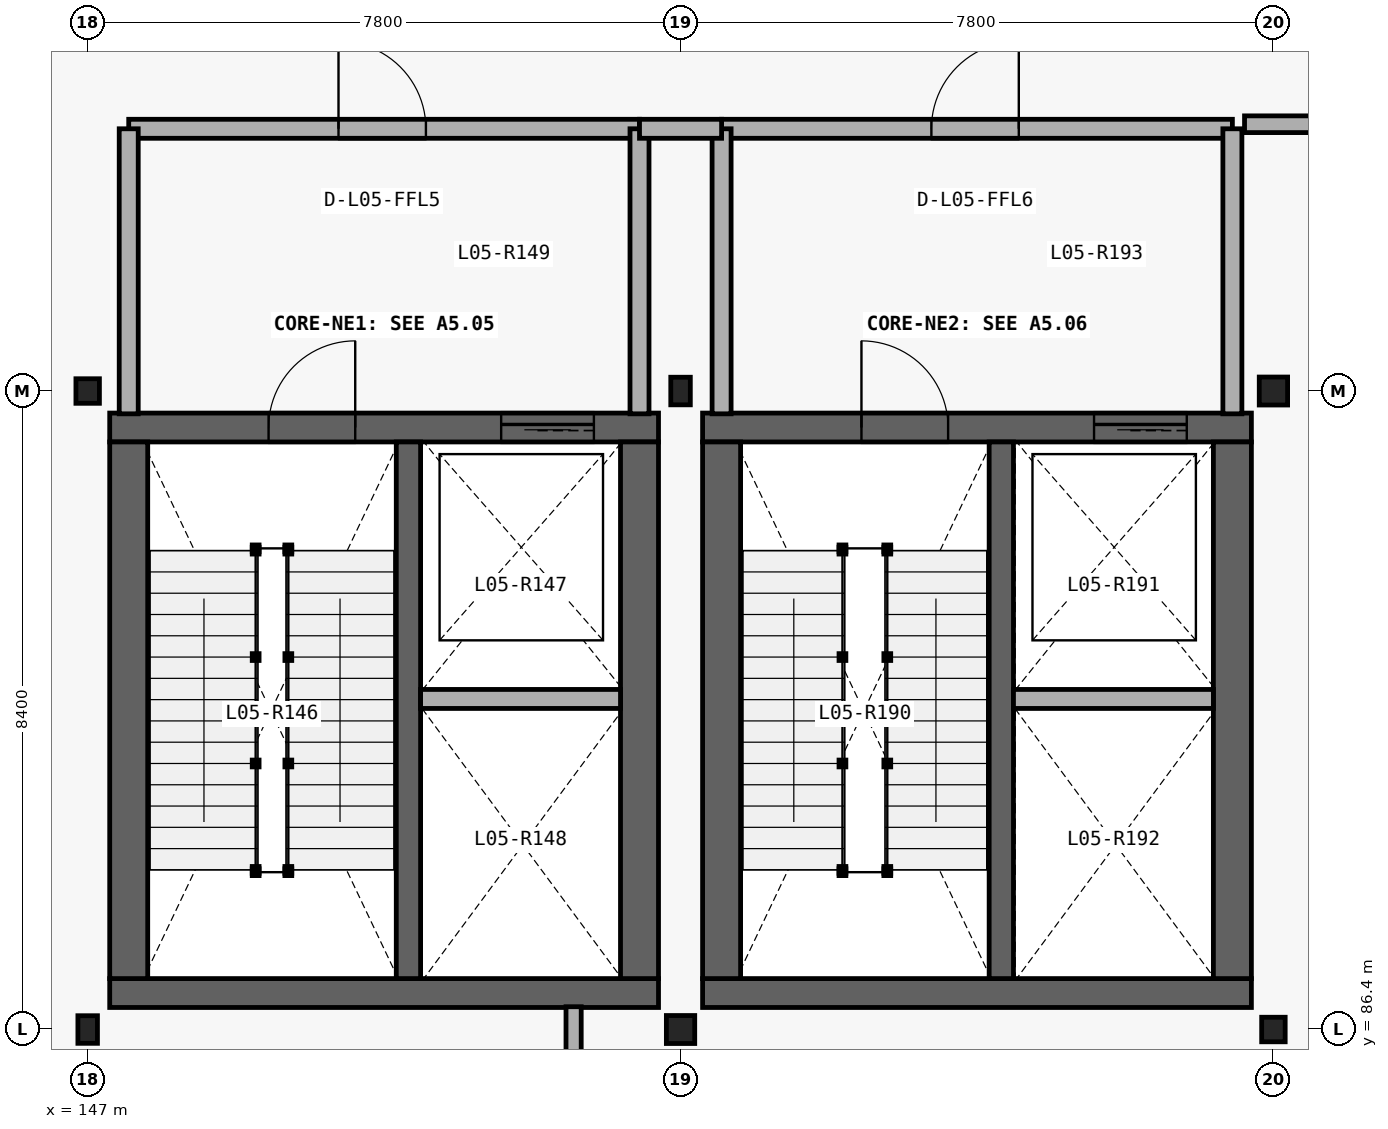
"""IFC4 building model, lengths in metres.
Left out: names, types, materials, properties, quantities, classifications, styles, units other than length and angle.
Written with IfcOpenShell. Run it as: python <this file> out.ifc"""

import sys

from ifc_helpers import new_model, si_unit, direction, frame, frame_2d, origin_with_axes, origin_2d_with_axis, place, context, subcontext, project, spatial, rectangle, i_section, extrude, element, fill, save


model = new_model("IFC4")
c1 = context("Model", 3, precision=1e-05, world=origin_with_axes(), true_north=direction((0.0, 1.0)))
c2 = subcontext(c1, "Body", "Model", "MODEL_VIEW")
j1 = project(units=[si_unit("LENGTHUNIT", "METRE"), si_unit("PLANEANGLEUNIT", "RADIAN")], contexts=[c1])
p1 = place(None, origin_with_axes())
s1 = spatial("IfcSite", under=j1, at=p1, CompositionType="ELEMENT")
p2 = place(p1, origin_with_axes())
s2 = spatial("IfcBuilding", under=s1, at=p2, CompositionType="ELEMENT")
p3 = place(p2, frame((0.0, 0.0, 24.9), z_axis=(0.0, 0.0, 1.0), x_axis=(1.0, 0.0, 0.0)))
s3 = spatial("IfcBuildingStorey", under=s2, at=p3, CompositionType="ELEMENT", Elevation=24.9)
p4 = place(None, frame((147.29, 86.88, 24.9), z_axis=(0.0, 0.0, 1.0), x_axis=(1.0, 0.0, 0.0)))
e1 = element("IfcWall", 1, at=p4, inside=s3, PredefinedType="SHEAR", context=c2, shape_type="SweptSolid", body=[
    extrude(rectangle(XDim=7.22, YDim=0.38, at=frame_2d((3.61, 0.0), x_axis=(1.0, 0.0))), origin_with_axes(), (0.0, 0.0, 1.0), 4.8),
])
p5 = place(None, frame((154.51, 94.32, 24.9), z_axis=(0.0, 0.0, 1.0), x_axis=(-1.0, 0.0, 0.0)))
e2 = element("IfcWall", 2, at=p5, inside=s3, PredefinedType="SHEAR", context=c2, shape_type="SweptSolid", body=[
    extrude(rectangle(XDim=7.22, YDim=0.38, at=frame_2d((3.61, 0.0), x_axis=(1.0, 0.0))), origin_with_axes(), (0.0, 0.0, 1.0), 4.8),
])
p6 = place(None, frame((149.95, 94.32, 24.9), z_axis=(0.0, 0.0, 1.0), x_axis=(-1.0, 0.0, 0.0)))
e3 = element("IfcOpeningElement", 3, at=p6, cuts=e2, PredefinedType="OPENING", context=c2, shape_type="SweptSolid", body=[
    extrude(rectangle(XDim=1.14, YDim=2.18, at=frame_2d((0.0, 1.09), x_axis=(1.0, 0.0))), frame((0.0, 0.2, 0.0), z_axis=(0.0, -1.0, 0.0), x_axis=(1.0, 0.0, 0.0)), (0.0, 0.0, 1.0), 0.4),
])
p7 = place(None, frame((153.05, 94.32, 24.9), z_axis=(0.0, 0.0, 1.0), x_axis=(-1.0, 0.0, 0.0)))
e4 = element("IfcOpeningElement", 4, at=p7, cuts=e2, PredefinedType="OPENING", context=c2, shape_type="SweptSolid", body=[
    extrude(rectangle(XDim=1.22, YDim=2.28, at=frame_2d((0.0, 1.14), x_axis=(1.0, 0.0))), frame((0.0, 0.2, 0.0), z_axis=(0.0, -1.0, 0.0), x_axis=(1.0, 0.0, 0.0)), (0.0, 0.0, 1.0), 0.4),
])
for number, where, z_axis, x_axis in (
    (5, (154.26, 87.07, 24.9), (0.0, 0.0, 1.0), (0.0, 1.0, 0.0)),
    (6, (147.54, 94.13, 24.9), (0.0, 0.0, 1.0), (0.0, -1.0, 0.0)),
):
    element("IfcWall", number, at=place(None, frame(where, z_axis=z_axis, x_axis=x_axis)), inside=s3, PredefinedType="SHEAR", context=c2, shape_type="SweptSolid", body=[
        extrude(rectangle(XDim=7.06, YDim=0.5, at=frame_2d((3.53, 0.0), x_axis=(1.0, 0.0))), origin_with_axes(), (0.0, 0.0, 1.0), 4.8),
    ])
p8 = place(None, frame((151.22, 87.07, 24.9), z_axis=(0.0, 0.0, 1.0), x_axis=(0.0, 1.0, 0.0)))
e7 = element("IfcWall", 7, at=p8, inside=s3, PredefinedType="SHEAR", context=c2, shape_type="SweptSolid", body=[
    extrude(rectangle(XDim=7.06, YDim=0.32, at=frame_2d((3.53, 0.0), x_axis=(1.0, 0.0))), origin_with_axes(), (0.0, 0.0, 1.0), 4.8),
])
p9 = place(None, frame((151.38, 90.749, 24.9), z_axis=(0.0, 0.0, 1.0), x_axis=(1.0, 0.0, 0.0)))
e8 = element("IfcWall", 8, at=p9, inside=s3, PredefinedType="PARTITIONING", context=c2, shape_type="SweptSolid", body=[
    extrude(rectangle(XDim=2.63, YDim=0.25, at=frame_2d((1.315, 0.0), x_axis=(1.0, 0.0))), origin_with_axes(), (0.0, 0.0, 1.0), 4.44),
])
p10 = place(None, frame((154.26, 98.25, 24.9), z_axis=(0.0, 0.0, 1.0), x_axis=(-1.0, 0.0, 0.0)))
e9 = element("IfcWall", 9, at=p10, inside=s3, PredefinedType="PARTITIONING", context=c2, shape_type="SweptSolid", body=[
    extrude(rectangle(XDim=6.72, YDim=0.25, at=frame_2d((3.36, 0.0), x_axis=(1.0, 0.0))), origin_with_axes(), (0.0, 0.0, 1.0), 4.44),
])
p11 = place(None, frame((150.875, 98.25, 24.9), z_axis=(0.0, 0.0, 1.0), x_axis=(-1.0, 0.0, 0.0)))
e10 = element("IfcOpeningElement", 10, at=p11, cuts=e9, PredefinedType="OPENING", context=c2, shape_type="SweptSolid", body=[
    extrude(rectangle(XDim=1.15, YDim=2.25, at=frame_2d((0.0, 1.125), x_axis=(1.0, 0.0))), frame((0.0, 0.135, 0.0), z_axis=(0.0, -1.0, 0.0), x_axis=(1.0, 0.0, 0.0)), (0.0, 0.0, 1.0), 0.27),
])
for number, where, z_axis, x_axis in (
    (11, (147.54, 94.5, 24.9), (0.0, 0.0, 1.0), (0.0, 1.0, 0.0)),
    (12, (154.26, 94.5, 24.9), (0.0, 0.0, 1.0), (0.0, 1.0, 0.0)),
):
    element("IfcWall", number, at=place(None, frame(where, z_axis=z_axis, x_axis=x_axis)), inside=s3, PredefinedType="PARTITIONING", context=c2, shape_type="SweptSolid", body=[
        extrude(rectangle(XDim=3.75, YDim=0.25, at=frame_2d((1.875, 0.0), x_axis=(1.0, 0.0))), origin_with_axes(), (0.0, 0.0, 1.0), 4.44),
    ])
p12 = place(None, frame((155.09, 86.88, 24.9), z_axis=(0.0, 0.0, 1.0), x_axis=(1.0, 0.0, 0.0)))
e13 = element("IfcWall", 13, at=p12, inside=s3, PredefinedType="SHEAR", context=c2, shape_type="SweptSolid", body=[
    extrude(rectangle(XDim=7.22, YDim=0.38, at=frame_2d((3.61, 0.0), x_axis=(1.0, 0.0))), origin_with_axes(), (0.0, 0.0, 1.0), 4.8),
])
p13 = place(None, frame((162.31, 94.32, 24.9), z_axis=(0.0, 0.0, 1.0), x_axis=(-1.0, 0.0, 0.0)))
e14 = element("IfcWall", 14, at=p13, inside=s3, PredefinedType="SHEAR", context=c2, shape_type="SweptSolid", body=[
    extrude(rectangle(XDim=7.22, YDim=0.38, at=frame_2d((3.61, 0.0), x_axis=(1.0, 0.0))), origin_with_axes(), (0.0, 0.0, 1.0), 4.8),
])
p14 = place(None, frame((157.75, 94.32, 24.9), z_axis=(0.0, 0.0, 1.0), x_axis=(-1.0, 0.0, 0.0)))
e15 = element("IfcOpeningElement", 15, at=p14, cuts=e14, PredefinedType="OPENING", context=c2, shape_type="SweptSolid", body=[
    extrude(rectangle(XDim=1.14, YDim=2.18, at=frame_2d((0.0, 1.09), x_axis=(1.0, 0.0))), frame((0.0, 0.2, 0.0), z_axis=(0.0, -1.0, 0.0), x_axis=(1.0, 0.0, 0.0)), (0.0, 0.0, 1.0), 0.4),
])
p15 = place(None, frame((160.85, 94.32, 24.9), z_axis=(0.0, 0.0, 1.0), x_axis=(-1.0, 0.0, 0.0)))
e16 = element("IfcOpeningElement", 16, at=p15, cuts=e14, PredefinedType="OPENING", context=c2, shape_type="SweptSolid", body=[
    extrude(rectangle(XDim=1.22, YDim=2.28, at=frame_2d((0.0, 1.14), x_axis=(1.0, 0.0))), frame((0.0, 0.2, 0.0), z_axis=(0.0, -1.0, 0.0), x_axis=(1.0, 0.0, 0.0)), (0.0, 0.0, 1.0), 0.4),
])
for number, where, z_axis, x_axis in (
    (17, (162.06, 87.07, 24.9), (0.0, 0.0, 1.0), (0.0, 1.0, 0.0)),
    (18, (155.34, 94.13, 24.9), (0.0, 0.0, 1.0), (0.0, -1.0, 0.0)),
):
    element("IfcWall", number, at=place(None, frame(where, z_axis=z_axis, x_axis=x_axis)), inside=s3, PredefinedType="SHEAR", context=c2, shape_type="SweptSolid", body=[
        extrude(rectangle(XDim=7.06, YDim=0.5, at=frame_2d((3.53, 0.0), x_axis=(1.0, 0.0))), origin_with_axes(), (0.0, 0.0, 1.0), 4.8),
    ])
p16 = place(None, frame((159.02, 87.07, 24.9), z_axis=(0.0, 0.0, 1.0), x_axis=(0.0, 1.0, 0.0)))
e19 = element("IfcWall", 19, at=p16, inside=s3, PredefinedType="SHEAR", context=c2, shape_type="SweptSolid", body=[
    extrude(rectangle(XDim=7.06, YDim=0.32, at=frame_2d((3.53, 0.0), x_axis=(1.0, 0.0))), origin_with_axes(), (0.0, 0.0, 1.0), 4.8),
])
p17 = place(None, frame((159.18, 90.749, 24.9), z_axis=(0.0, 0.0, 1.0), x_axis=(1.0, 0.0, 0.0)))
e20 = element("IfcWall", 20, at=p17, inside=s3, PredefinedType="PARTITIONING", context=c2, shape_type="SweptSolid", body=[
    extrude(rectangle(XDim=2.63, YDim=0.25, at=frame_2d((1.315, 0.0), x_axis=(1.0, 0.0))), origin_with_axes(), (0.0, 0.0, 1.0), 4.44),
])
p18 = place(None, frame((162.06, 98.25, 24.9), z_axis=(0.0, 0.0, 1.0), x_axis=(-1.0, 0.0, 0.0)))
e21 = element("IfcWall", 21, at=p18, inside=s3, PredefinedType="PARTITIONING", context=c2, shape_type="SweptSolid", body=[
    extrude(rectangle(XDim=6.72, YDim=0.25, at=frame_2d((3.36, 0.0), x_axis=(1.0, 0.0))), origin_with_axes(), (0.0, 0.0, 1.0), 4.44),
])
p19 = place(None, frame((158.675, 98.25, 24.9), z_axis=(0.0, 0.0, 1.0), x_axis=(-1.0, 0.0, 0.0)))
e22 = element("IfcOpeningElement", 22, at=p19, cuts=e21, PredefinedType="OPENING", context=c2, shape_type="SweptSolid", body=[
    extrude(rectangle(XDim=1.15, YDim=2.25, at=frame_2d((0.0, 1.125), x_axis=(1.0, 0.0))), frame((0.0, 0.135, 0.0), z_axis=(0.0, -1.0, 0.0), x_axis=(1.0, 0.0, 0.0)), (0.0, 0.0, 1.0), 0.27),
])
for number, where, z_axis, x_axis in (
    (23, (155.34, 94.5, 24.9), (0.0, 0.0, 1.0), (0.0, 1.0, 0.0)),
    (24, (162.06, 94.5, 24.9), (0.0, 0.0, 1.0), (0.0, 1.0, 0.0)),
):
    element("IfcWall", number, at=place(None, frame(where, z_axis=z_axis, x_axis=x_axis)), inside=s3, PredefinedType="PARTITIONING", context=c2, shape_type="SweptSolid", body=[
        extrude(rectangle(XDim=3.75, YDim=0.25, at=frame_2d((1.875, 0.0), x_axis=(1.0, 0.0))), origin_with_axes(), (0.0, 0.0, 1.0), 4.44),
    ])
p20 = place(None, frame((154.26, 98.25, 24.9), z_axis=(0.0, 0.0, 1.0), x_axis=(1.0, 0.0, 0.0)))
e25 = element("IfcWall", 25, at=p20, inside=s3, PredefinedType="PARTITIONING", context=c2, shape_type="SweptSolid", body=[
    extrude(rectangle(XDim=1.08, YDim=0.25, at=frame_2d((0.54, 0.0), x_axis=(1.0, 0.0))), origin_with_axes(), (0.0, 0.0, 1.0), 4.44),
])
p21 = place(None, frame((162.22, 98.31, 24.9), z_axis=(0.0, 0.0, 1.0), x_axis=(1.0, 0.0, 0.0)))
e26 = element("IfcWall", 26, at=p21, inside=s3, PredefinedType="PARTITIONING", context=c2, shape_type="SweptSolid", body=[
    extrude(rectangle(XDim=7.04, YDim=0.22, at=frame_2d((3.52, 0.0), x_axis=(1.0, 0.0))), origin_with_axes(), (0.0, 0.0, 1.0), 4.44),
])
p22 = place(None, frame((164.242, 98.31, 24.9), z_axis=(0.0, 0.0, 1.0), x_axis=(1.0, 0.0, 0.0)))
e27 = element("IfcOpeningElement", 27, at=p22, cuts=e26, PredefinedType="OPENING", context=c2, shape_type="SweptSolid", body=[
    extrude(rectangle(XDim=1.64, YDim=2.42, at=frame_2d((0.0, 1.21), x_axis=(1.0, 0.0))), frame((0.0, 0.12, 0.0), z_axis=(0.0, -1.0, 0.0), x_axis=(1.0, 0.0, 0.0)), (0.0, 0.0, 1.0), 0.24),
])
p23 = place(None, frame((167.438, 98.31, 24.9), z_axis=(0.0, 0.0, 1.0), x_axis=(1.0, 0.0, 0.0)))
e28 = element("IfcOpeningElement", 28, at=p23, cuts=e26, PredefinedType="OPENING", context=c2, shape_type="SweptSolid", body=[
    extrude(rectangle(XDim=0.95, YDim=2.1, at=frame_2d((0.0, 1.05), x_axis=(1.0, 0.0))), frame((0.0, 0.12, 0.0), z_axis=(0.0, -1.0, 0.0), x_axis=(1.0, 0.0, 0.0)), (0.0, 0.0, 1.0), 0.24),
])
p24 = place(None, frame((153.393, 78.14, 24.9), z_axis=(0.0, 0.0, 1.0), x_axis=(0.0, 1.0, 0.0)))
e29 = element("IfcWall", 29, at=p24, inside=s3, PredefinedType="PARTITIONING", context=c2, shape_type="SweptSolid", body=[
    extrude(rectangle(XDim=8.56, YDim=0.2, at=frame_2d((4.28, 0.0), x_axis=(1.0, 0.0))), origin_with_axes(), (0.0, 0.0, 1.0), 4.44),
])
p25 = place(None, frame((147.0, 86.4, 24.9), z_axis=(0.0, 0.0, 1.0), x_axis=(1.0, 0.0, 0.0)))
e30 = element("IfcColumn", 30, at=p25, inside=s3, PredefinedType="COLUMN", context=c2, shape_type="SweptSolid", body=[
    extrude(i_section(OverallWidth=0.257, OverallDepth=0.363, WebThickness=0.013, FlangeThickness=0.022, at=origin_2d_with_axis()), origin_with_axes(), (0.0, 0.0, 1.0), 4.8),
])
p26 = place(None, frame((147.0, 94.8, 24.9), z_axis=(0.0, 0.0, 1.0), x_axis=(1.0, 0.0, 0.0)))
e31 = element("IfcColumn", 31, at=p26, inside=s3, PredefinedType="COLUMN", context=c2, shape_type="SweptSolid", body=[
    extrude(i_section(OverallWidth=0.309, OverallDepth=0.323, WebThickness=0.014, FlangeThickness=0.023, at=origin_2d_with_axis()), origin_with_axes(), (0.0, 0.0, 1.0), 4.8),
])
p27 = place(None, frame((154.8, 86.4, 24.9), z_axis=(0.0, 0.0, 1.0), x_axis=(1.0, 0.0, 0.0)))
e32 = element("IfcColumn", 32, at=p27, inside=s3, PredefinedType="COLUMN", context=c2, shape_type="SweptSolid", body=[
    extrude(i_section(OverallWidth=0.373, OverallDepth=0.368, WebThickness=0.015, FlangeThickness=0.024, at=origin_2d_with_axis()), origin_with_axes(), (0.0, 0.0, 1.0), 4.8),
])
p28 = place(None, frame((154.8, 94.8, 24.9), z_axis=(0.0, 0.0, 1.0), x_axis=(1.0, 0.0, 0.0)))
e33 = element("IfcColumn", 33, at=p28, inside=s3, PredefinedType="COLUMN", context=c2, shape_type="SweptSolid", body=[
    extrude(i_section(OverallWidth=0.257, OverallDepth=0.363, WebThickness=0.013, FlangeThickness=0.022, at=origin_2d_with_axis()), origin_with_axes(), (0.0, 0.0, 1.0), 4.8),
])
p29 = place(None, frame((162.6, 86.4, 24.9), z_axis=(0.0, 0.0, 1.0), x_axis=(1.0, 0.0, 0.0)))
e34 = element("IfcColumn", 34, at=p29, inside=s3, PredefinedType="COLUMN", context=c2, shape_type="SweptSolid", body=[
    extrude(i_section(OverallWidth=0.309, OverallDepth=0.323, WebThickness=0.014, FlangeThickness=0.023, at=origin_2d_with_axis()), origin_with_axes(), (0.0, 0.0, 1.0), 4.8),
])
p30 = place(None, frame((162.6, 94.8, 24.9), z_axis=(0.0, 0.0, 1.0), x_axis=(1.0, 0.0, 0.0)))
e35 = element("IfcColumn", 35, at=p30, inside=s3, PredefinedType="COLUMN", context=c2, shape_type="SweptSolid", body=[
    extrude(i_section(OverallWidth=0.373, OverallDepth=0.368, WebThickness=0.015, FlangeThickness=0.024, at=origin_2d_with_axis()), origin_with_axes(), (0.0, 0.0, 1.0), 4.8),
])
p31 = place(None, frame((149.95, 94.32, 24.9), z_axis=(0.0, 0.0, 1.0), x_axis=(1.0, 0.0, 0.0)))
e36 = element("IfcDoor", 36, at=p31, inside=s3, OperationType="SINGLE_SWING_LEFT", PredefinedType="DOOR", context=c2, shape_type="SweptSolid", body=[
    extrude(rectangle(XDim=1.14, YDim=2.18, at=frame_2d((0.0, 1.09), x_axis=(1.0, 0.0))), frame((0.0, 0.04, 0.0), z_axis=(0.0, -1.0, 0.0), x_axis=(1.0, 0.0, 0.0)), (0.0, 0.0, 1.0), 0.08),
])
fill(e3, e36)
p32 = place(None, frame((153.05, 94.32, 24.9), z_axis=(0.0, 0.0, 1.0), x_axis=(1.0, 0.0, 0.0)))
e37 = element("IfcDoor", 37, at=p32, inside=s3, OperationType="SLIDING_TO_LEFT", PredefinedType="DOOR", context=c2, shape_type="SweptSolid", body=[
    extrude(rectangle(XDim=1.22, YDim=2.28, at=frame_2d((0.0, 1.14), x_axis=(1.0, 0.0))), frame((0.0, 0.04, 0.0), z_axis=(0.0, -1.0, 0.0), x_axis=(1.0, 0.0, 0.0)), (0.0, 0.0, 1.0), 0.08),
])
fill(e4, e37)
p33 = place(None, frame((150.875, 98.25, 24.9), z_axis=(0.0, 0.0, 1.0), x_axis=(1.0, 0.0, 0.0)))
e38 = element("IfcDoor", 38, at=p33, inside=s3, OperationType="SINGLE_SWING_RIGHT", PredefinedType="DOOR", context=c2, shape_type="SweptSolid", body=[
    extrude(rectangle(XDim=1.15, YDim=2.25, at=frame_2d((0.0, 1.125), x_axis=(1.0, 0.0))), frame((0.0, 0.04, 0.0), z_axis=(0.0, -1.0, 0.0), x_axis=(1.0, 0.0, 0.0)), (0.0, 0.0, 1.0), 0.08),
])
fill(e10, e38)
p34 = place(None, frame((157.75, 94.32, 24.9), z_axis=(0.0, 0.0, 1.0), x_axis=(1.0, 0.0, 0.0)))
e39 = element("IfcDoor", 39, at=p34, inside=s3, OperationType="SINGLE_SWING_RIGHT", PredefinedType="DOOR", context=c2, shape_type="SweptSolid", body=[
    extrude(rectangle(XDim=1.14, YDim=2.18, at=frame_2d((0.0, 1.09), x_axis=(1.0, 0.0))), frame((0.0, 0.04, 0.0), z_axis=(0.0, -1.0, 0.0), x_axis=(1.0, 0.0, 0.0)), (0.0, 0.0, 1.0), 0.08),
])
fill(e15, e39)
p35 = place(None, frame((160.85, 94.32, 24.9), z_axis=(0.0, 0.0, 1.0), x_axis=(1.0, 0.0, 0.0)))
e40 = element("IfcDoor", 40, at=p35, inside=s3, OperationType="SLIDING_TO_LEFT", PredefinedType="DOOR", context=c2, shape_type="SweptSolid", body=[
    extrude(rectangle(XDim=1.22, YDim=2.28, at=frame_2d((0.0, 1.14), x_axis=(1.0, 0.0))), frame((0.0, 0.04, 0.0), z_axis=(0.0, -1.0, 0.0), x_axis=(1.0, 0.0, 0.0)), (0.0, 0.0, 1.0), 0.08),
])
fill(e16, e40)
p36 = place(None, frame((158.675, 98.25, 24.9), z_axis=(0.0, 0.0, 1.0), x_axis=(1.0, 0.0, 0.0)))
e41 = element("IfcDoor", 41, at=p36, inside=s3, OperationType="SINGLE_SWING_LEFT", PredefinedType="DOOR", context=c2, shape_type="SweptSolid", body=[
    extrude(rectangle(XDim=1.15, YDim=2.25, at=frame_2d((0.0, 1.125), x_axis=(1.0, 0.0))), frame((0.0, 0.04, 0.0), z_axis=(0.0, -1.0, 0.0), x_axis=(1.0, 0.0, 0.0)), (0.0, 0.0, 1.0), 0.08),
])
fill(e22, e41)
save(model, sys.argv[1])
